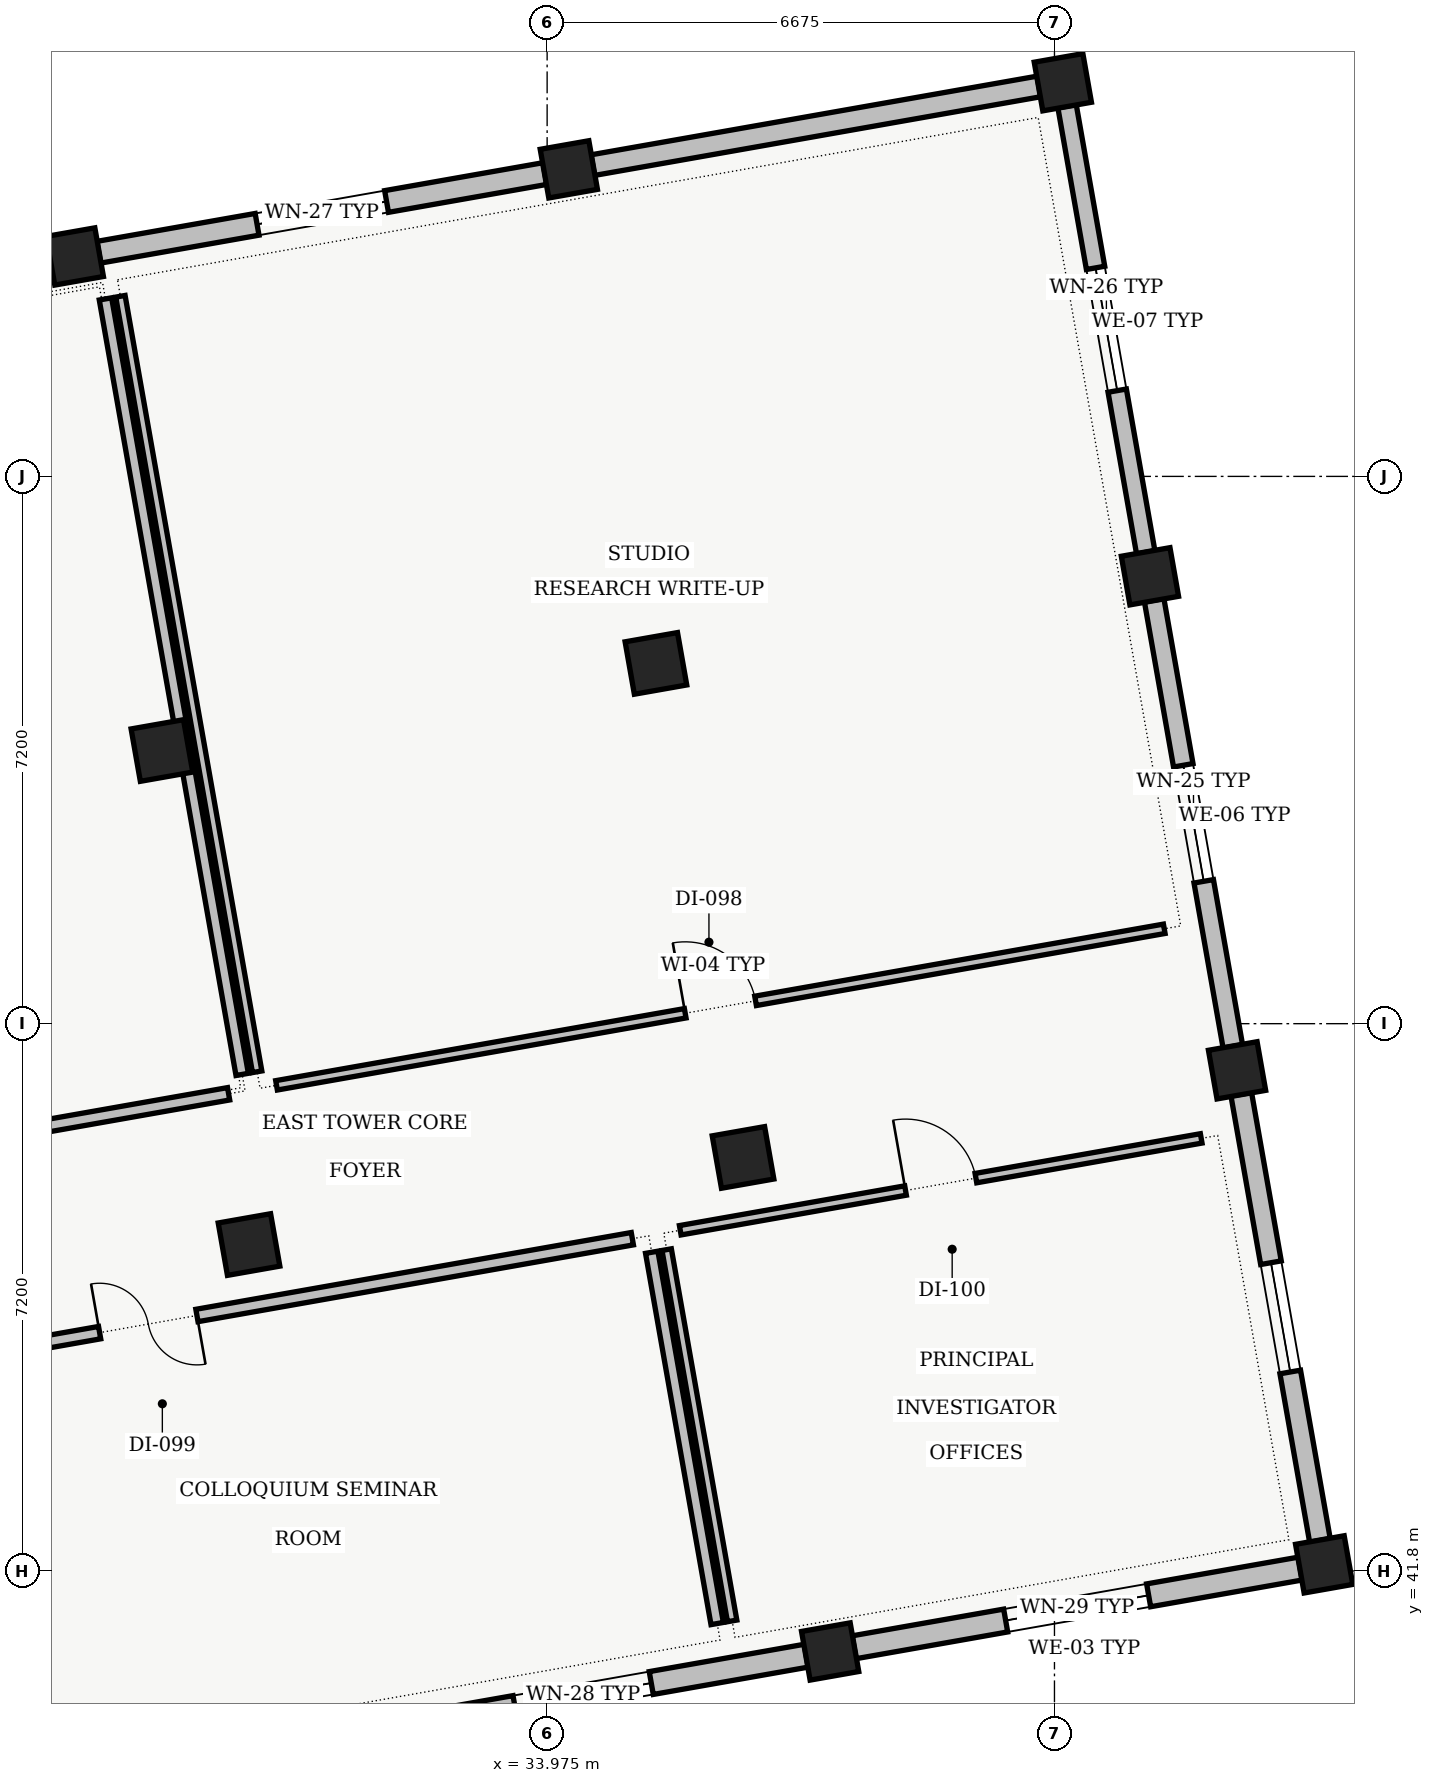
"""IFC4 building model, lengths in metres.
Left out: names, types, materials, properties, quantities, classifications, styles, units other than length and angle.
Written with IfcOpenShell. Run it as: python <this file> out.ifc"""

import sys

from ifc_helpers import new_model, si_unit, direction, frame, frame_2d, origin, origin_2d, place, context, subcontext, project, spatial, rectangle, extrude, element, fill, save


model = new_model("IFC4")
c1 = context("Model", 3, precision=1e-05, world=origin(), true_north=direction((0.0, 1.0)))
c2 = subcontext(c1, "Body", "Model", "MODEL_VIEW")
j1 = project(units=[si_unit("LENGTHUNIT", "METRE"), si_unit("PLANEANGLEUNIT", "RADIAN")], contexts=[c1])
p1 = place(None, origin())
s1 = spatial("IfcSite", under=j1, at=p1, CompositionType="ELEMENT")
p2 = place(p1, origin())
s2 = spatial("IfcBuilding", under=s1, at=p2, CompositionType="ELEMENT")
p3 = place(p2, frame((0.0, 0.0, 14.1)))
s3 = spatial("IfcBuildingStorey", under=s2, at=p3, CompositionType="ELEMENT", Elevation=14.1)
for number, where, z_axis, x_axis in (
    (1, (30.053, 46.094, 0.0), (0.0, 0.0, 1.0), (0.985, 0.174, 0.0)),
    (2, (28.907, 52.594, 0.0), (0.0, 0.0, 1.0), (0.985, 0.174, 0.0)),
):
    element("IfcColumn", number, at=place(p3, frame(where, z_axis=z_axis, x_axis=x_axis)), inside=s3, PredefinedType="COLUMN", context=c2, shape_type="SweptSolid", body=[
        extrude(rectangle(XDim=0.7, YDim=0.7, at=origin_2d()), origin(), (0.0, 0.0, 1.0), 4.31),
    ])
for number, where, z_axis, x_axis in (
    (3, (27.761, 59.094, 0.0), (0.0, 0.0, 1.0), (0.985, 0.174, 0.0)),
    (4, (37.699, 40.74, 0.0), (0.0, 0.0, 1.0), (0.985, 0.174, 0.0)),
):
    element("IfcColumn", number, at=place(p3, frame(where, z_axis=z_axis, x_axis=x_axis)), inside=s3, PredefinedType="COLUMN", context=c2, shape_type="SweptSolid", body=[
        extrude(rectangle(XDim=0.65, YDim=0.65, at=origin_2d()), origin(), (0.0, 0.0, 1.0), 4.31),
    ])
for number, where, z_axis, x_axis in (
    (5, (36.552, 47.24, 0.0), (0.0, 0.0, 1.0), (0.985, 0.174, 0.0)),
    (6, (35.406, 53.74, 0.0), (0.0, 0.0, 1.0), (0.985, 0.174, 0.0)),
):
    element("IfcColumn", number, at=place(p3, frame(where, z_axis=z_axis, x_axis=x_axis)), inside=s3, PredefinedType="COLUMN", context=c2, shape_type="SweptSolid", body=[
        extrude(rectangle(XDim=0.7, YDim=0.7, at=origin_2d()), origin(), (0.0, 0.0, 1.0), 4.31),
    ])
for number, where, z_axis, x_axis in (
    (7, (34.26, 60.24, 0.0), (0.0, 0.0, 1.0), (0.985, 0.174, 0.0)),
    (8, (44.198, 41.886, 0.0), (0.0, 0.0, 1.0), (0.985, 0.174, 0.0)),
    (9, (43.052, 48.386, 0.0), (0.0, 0.0, 1.0), (0.985, 0.174, 0.0)),
    (10, (41.906, 54.886, 0.0), (0.0, 0.0, 1.0), (0.985, 0.174, 0.0)),
    (11, (40.76, 61.386, 0.0), (0.0, 0.0, 1.0), (0.985, 0.174, 0.0)),
):
    element("IfcColumn", number, at=place(p3, frame(where, z_axis=z_axis, x_axis=x_axis)), inside=s3, PredefinedType="COLUMN", context=c2, shape_type="SweptSolid", body=[
        extrude(rectangle(XDim=0.65, YDim=0.65, at=origin_2d()), origin(), (0.0, 0.0, 1.0), 4.31),
    ])
p4 = place(p3, frame((28.076, 59.149, 0.0), z_axis=(0.0, 0.0, 1.0), x_axis=(0.98480829201, 0.173645120828, 0.0)))
e12 = element("IfcWall", 12, at=p4, inside=s3, PredefinedType="STANDARD", context=c2, shape_type="SweptSolid", body=[
    extrude(rectangle(XDim=5.96, YDim=0.29, at=frame_2d((2.98, 0.0))), origin(), (0.0, 0.0, 1.0), 3.795),
])
p5 = place(p4, frame((2.115, 0.0, 0.95)))
e13 = element("IfcOpeningElement", 13, at=p5, cuts=e12, PredefinedType="OPENING", context=c2, shape_type="SweptSolid", body=[
    extrude(rectangle(XDim=1.73, YDim=1.36, at=frame_2d((0.865, 0.68))), frame((0.0, 0.145, 0.0), z_axis=(0.0, -1.0, 0.0), x_axis=(1.0, 0.0, 0.0)), (0.0, 0.0, 1.0), 0.29),
])
p6 = place(p3, frame((34.575, 60.295, 0.0), z_axis=(0.0, 0.0, 1.0), x_axis=(0.984809527099, 0.173638116021, 0.0)))
e14 = element("IfcWall", 14, at=p6, inside=s3, PredefinedType="STANDARD", context=c2, shape_type="SweptSolid", body=[
    extrude(rectangle(XDim=5.96, YDim=0.275, at=frame_2d((2.98, 0.0))), origin(), (0.0, 0.0, 1.0), 3.795),
])
p7 = place(p3, frame((40.816, 61.071, 0.0), z_axis=(0.0, 0.0, 1.0), x_axis=(0.173645120828, -0.98480829201, 0.0)))
e15 = element("IfcWall", 15, at=p7, inside=s3, PredefinedType="STANDARD", context=c2, shape_type="SweptSolid", body=[
    extrude(rectangle(XDim=5.96, YDim=0.245, at=frame_2d((2.98, 0.0))), origin(), (0.0, 0.0, 1.0), 3.795),
])
p8 = place(p7, frame((2.16, 0.0, 0.95)))
e16 = element("IfcOpeningElement", 16, at=p8, cuts=e15, PredefinedType="OPENING", context=c2, shape_type="SweptSolid", body=[
    extrude(rectangle(XDim=1.64, YDim=1.48, at=frame_2d((0.82, 0.74))), frame((0.0, 0.123, 0.0), z_axis=(0.0, -1.0, 0.0), x_axis=(1.0, 0.0, 0.0)), (0.0, 0.0, 1.0), 0.245),
])
p9 = place(p3, frame((41.962, 54.571, 0.0), z_axis=(0.0, 0.0, 1.0), x_axis=(0.173645120828, -0.98480829201, 0.0)))
e17 = element("IfcWall", 17, at=p9, inside=s3, PredefinedType="STANDARD", context=c2, shape_type="SweptSolid", body=[
    extrude(rectangle(XDim=5.96, YDim=0.26, at=frame_2d((2.98, 0.0))), origin(), (0.0, 0.0, 1.0), 3.795),
])
p10 = place(p9, frame((2.205, 0.0, 0.95)))
e18 = element("IfcOpeningElement", 18, at=p10, cuts=e17, PredefinedType="OPENING", context=c2, shape_type="SweptSolid", body=[
    extrude(rectangle(XDim=1.55, YDim=1.46, at=frame_2d((0.775, 0.73))), frame((0.0, 0.13, 0.0), z_axis=(0.0, -1.0, 0.0), x_axis=(1.0, 0.0, 0.0)), (0.0, 0.0, 1.0), 0.26),
])
p11 = place(p3, frame((43.108, 48.071, 0.0), z_axis=(0.0, 0.0, 1.0), x_axis=(0.173645120828, -0.98480829201, 0.0)))
e19 = element("IfcWall", 19, at=p11, inside=s3, PredefinedType="STANDARD", context=c2, shape_type="SweptSolid", body=[
    extrude(rectangle(XDim=5.96, YDim=0.275, at=frame_2d((2.98, 0.0))), origin(), (0.0, 0.0, 1.0), 3.795),
])
p12 = place(p11, frame((2.25, 0.0, 0.95)))
e20 = element("IfcOpeningElement", 20, at=p12, cuts=e19, PredefinedType="OPENING", context=c2, shape_type="SweptSolid", body=[
    extrude(rectangle(XDim=1.46, YDim=1.44, at=frame_2d((0.73, 0.72))), frame((0.0, 0.137, 0.0), z_axis=(0.0, -1.0, 0.0), x_axis=(1.0, 0.0, 0.0)), (0.0, 0.0, 1.0), 0.275),
])
p13 = place(p3, frame((43.883, 41.831, 0.0), z_axis=(0.0, 0.0, 1.0), x_axis=(-0.98480829201, -0.173645120828, 0.0)))
e21 = element("IfcWall", 21, at=p13, inside=s3, PredefinedType="STANDARD", context=c2, shape_type="SweptSolid", body=[
    extrude(rectangle(XDim=5.96, YDim=0.305, at=frame_2d((2.98, 0.0))), origin(), (0.0, 0.0, 1.0), 3.795),
])
p14 = place(p13, frame((2.025, 0.0, 0.95)))
e22 = element("IfcOpeningElement", 22, at=p14, cuts=e21, PredefinedType="OPENING", context=c2, shape_type="SweptSolid", body=[
    extrude(rectangle(XDim=1.91, YDim=1.4, at=frame_2d((0.955, 0.7))), frame((0.0, 0.152, 0.0), z_axis=(0.0, -1.0, 0.0), x_axis=(1.0, 0.0, 0.0)), (0.0, 0.0, 1.0), 0.305),
])
p15 = place(p3, frame((37.384, 40.685, 0.0), z_axis=(0.0, 0.0, 1.0), x_axis=(-0.98480829201, -0.173645120828, 0.0)))
e23 = element("IfcWall", 23, at=p15, inside=s3, PredefinedType="STANDARD", context=c2, shape_type="SweptSolid", body=[
    extrude(rectangle(XDim=5.96, YDim=0.305, at=frame_2d((2.98, 0.0))), origin(), (0.0, 0.0, 1.0), 3.795),
])
p16 = place(p15, frame((2.07, 0.0, 0.95)))
e24 = element("IfcOpeningElement", 24, at=p16, cuts=e23, PredefinedType="OPENING", context=c2, shape_type="SweptSolid", body=[
    extrude(rectangle(XDim=1.82, YDim=1.38, at=frame_2d((0.91, 0.69))), frame((0.0, 0.152, 0.0), z_axis=(0.0, -1.0, 0.0), x_axis=(1.0, 0.0, 0.0)), (0.0, 0.0, 1.0), 0.305),
])
p17 = place(p3, frame((20.665, 46.469, 0.0), z_axis=(0.0, 0.0, 1.0), x_axis=(0.984804784872, 0.173665009985, 0.0)))
e25 = element("IfcWall", 25, at=p17, inside=s3, PredefinedType="PARTITIONING", context=c2, shape_type="SweptSolid", body=[
    extrude(rectangle(XDim=9.26, YDim=0.165, at=frame_2d((4.63, 0.0))), origin(), (0.0, 0.0, 1.0), 3.895),
])
p18 = place(p17, frame((4.175, 0.0, 0.0)))
e26 = element("IfcOpeningElement", 26, at=p18, cuts=e25, PredefinedType="OPENING", context=c2, shape_type="SweptSolid", body=[
    extrude(rectangle(XDim=0.91, YDim=2.08, at=frame_2d((0.455, 1.04))), frame((0.0, 0.083, 0.0), z_axis=(0.0, -1.0, 0.0), x_axis=(1.0, 0.0, 0.0)), (0.0, 0.0, 1.0), 0.165),
])
p19 = place(p3, frame((29.963, 48.333, 0.0), z_axis=(0.0, 0.0, 1.0), x_axis=(-0.173658960975, 0.984805851563, 0.0)))
e27 = element("IfcWall", 27, at=p19, inside=s3, PredefinedType="PARTITIONING", context=c2, shape_type="SweptSolid", body=[
    extrude(rectangle(XDim=10.36, YDim=0.165, at=frame_2d((5.18, 0.0))), origin(), (0.0, 0.0, 1.0), 3.695),
])
p20 = place(p3, frame((30.415, 48.189, 0.0), z_axis=(0.0, 0.0, 1.0), x_axis=(0.984810073067, 0.173635019467, 0.0)))
e28 = element("IfcWall", 28, at=p20, inside=s3, PredefinedType="PARTITIONING", context=c2, shape_type="SweptSolid", body=[
    extrude(rectangle(XDim=11.86, YDim=0.125, at=frame_2d((5.93, 0.0))), origin(), (0.0, 0.0, 1.0), 3.95),
])
p21 = place(p20, frame((5.46, 0.0, 0.0)))
e29 = element("IfcOpeningElement", 29, at=p21, cuts=e28, PredefinedType="OPENING", context=c2, shape_type="SweptSolid", body=[
    extrude(rectangle(XDim=0.94, YDim=2.12, at=frame_2d((0.47, 1.06))), frame((0.0, 0.062, 0.0), z_axis=(0.0, -1.0, 0.0), x_axis=(1.0, 0.0, 0.0)), (0.0, 0.0, 1.0), 0.125),
])
p22 = place(p3, frame((28.361, 58.57, 0.0), z_axis=(0.0, 0.0, 1.0), x_axis=(0.173632075677, -0.984810592092, 0.0)))
e30 = element("IfcWall", 30, at=p22, inside=s3, PredefinedType="PARTITIONING", context=c2, shape_type="SweptSolid", body=[
    extrude(rectangle(XDim=10.36, YDim=0.125, at=frame_2d((5.18, 0.0))), origin(), (0.0, 0.0, 1.0), 3.95),
])
p23 = place(p3, frame((36.212, 41.108, 0.0), z_axis=(0.0, 0.0, 1.0), x_axis=(-0.173611232021, 0.984814266812, 0.0)))
e31 = element("IfcWall", 31, at=p23, inside=s3, PredefinedType="PARTITIONING", context=c2, shape_type="SweptSolid", body=[
    extrude(rectangle(XDim=4.96, YDim=0.165, at=frame_2d((2.48, 0.0))), origin(), (0.0, 0.0, 1.0), 3.95),
])
p24 = place(p3, frame((35.096, 46.171, 0.0), z_axis=(0.0, 0.0, 1.0), x_axis=(-0.98480912325, -0.173640406486, 0.0)))
e32 = element("IfcWall", 32, at=p24, inside=s3, PredefinedType="PARTITIONING", context=c2, shape_type="SweptSolid", body=[
    extrude(rectangle(XDim=9.61, YDim=0.165, at=frame_2d((4.805, 0.0))), origin(), (0.0, 0.0, 1.0), 3.95),
])
p25 = place(p24, frame((5.817, 0.0, 0.0)))
e33 = element("IfcOpeningElement", 33, at=p25, cuts=e32, PredefinedType="OPENING", context=c2, shape_type="SweptSolid", body=[
    extrude(rectangle(XDim=1.3, YDim=2.18, at=frame_2d((0.65, 1.09))), frame((0.0, 0.083, 0.0), z_axis=(0.0, -1.0, 0.0), x_axis=(1.0, 0.0, 0.0)), (0.0, 0.0, 1.0), 0.165),
])
p26 = place(p3, frame((42.581, 47.491, 0.0), z_axis=(0.0, 0.0, 1.0), x_axis=(-0.984804033539, -0.173669270527, 0.0)))
e34 = element("IfcWall", 34, at=p26, inside=s3, PredefinedType="PARTITIONING", context=c2, shape_type="SweptSolid", body=[
    extrude(rectangle(XDim=6.96, YDim=0.125, at=frame_2d((3.48, 0.0))), origin(), (0.0, 0.0, 1.0), 3.95),
])
p27 = place(p26, frame((3.01, 0.0, 0.0)))
e35 = element("IfcOpeningElement", 35, at=p27, cuts=e34, PredefinedType="OPENING", context=c2, shape_type="SweptSolid", body=[
    extrude(rectangle(XDim=0.94, YDim=2.12, at=frame_2d((0.47, 1.06))), frame((0.0, 0.062, 0.0), z_axis=(0.0, -1.0, 0.0), x_axis=(1.0, 0.0, 0.0)), (0.0, 0.0, 1.0), 0.125),
])
p28 = place(p3, frame((35.548, 46.027, 0.0), z_axis=(0.0, 0.0, 1.0), x_axis=(0.173650553511, -0.984807334084, 0.0)))
e36 = element("IfcWall", 36, at=p28, inside=s3, PredefinedType="PARTITIONING", context=c2, shape_type="SweptSolid", body=[
    extrude(rectangle(XDim=4.96, YDim=0.125, at=frame_2d((2.48, 0.0))), origin(), (0.0, 0.0, 1.0), 3.95),
])
p29 = place(p5, origin())
e37 = element("IfcWindow", 37, at=p29, inside=s3, PartitioningType="SINGLE_PANEL", PredefinedType="WINDOW", context=c2, shape_type="SweptSolid", body=[
    extrude(rectangle(XDim=1.73, YDim=1.36, at=frame_2d((0.865, 0.68))), frame((0.0, 0.03, 0.0), z_axis=(0.0, -1.0, 0.0), x_axis=(1.0, 0.0, 0.0)), (0.0, 0.0, 1.0), 0.06),
])
fill(e13, e37)
p30 = place(p8, origin())
e38 = element("IfcWindow", 38, at=p30, inside=s3, PartitioningType="SINGLE_PANEL", PredefinedType="WINDOW", context=c2, shape_type="SweptSolid", body=[
    extrude(rectangle(XDim=1.64, YDim=1.48, at=frame_2d((0.82, 0.74))), frame((0.0, 0.03, 0.0), z_axis=(0.0, -1.0, 0.0), x_axis=(1.0, 0.0, 0.0)), (0.0, 0.0, 1.0), 0.06),
])
fill(e16, e38)
p31 = place(p10, origin())
e39 = element("IfcWindow", 39, at=p31, inside=s3, PartitioningType="SINGLE_PANEL", PredefinedType="WINDOW", context=c2, shape_type="SweptSolid", body=[
    extrude(rectangle(XDim=1.55, YDim=1.46, at=frame_2d((0.775, 0.73))), frame((0.0, 0.03, 0.0), z_axis=(0.0, -1.0, 0.0), x_axis=(1.0, 0.0, 0.0)), (0.0, 0.0, 1.0), 0.06),
])
fill(e18, e39)
p32 = place(p12, origin())
e40 = element("IfcWindow", 40, at=p32, inside=s3, PartitioningType="SINGLE_PANEL", PredefinedType="WINDOW", context=c2, shape_type="SweptSolid", body=[
    extrude(rectangle(XDim=1.46, YDim=1.44, at=frame_2d((0.73, 0.72))), frame((0.0, 0.03, 0.0), z_axis=(0.0, -1.0, 0.0), x_axis=(1.0, 0.0, 0.0)), (0.0, 0.0, 1.0), 0.06),
])
fill(e20, e40)
p33 = place(p14, origin())
e41 = element("IfcWindow", 41, at=p33, inside=s3, PartitioningType="SINGLE_PANEL", PredefinedType="WINDOW", context=c2, shape_type="SweptSolid", body=[
    extrude(rectangle(XDim=1.91, YDim=1.4, at=frame_2d((0.955, 0.7))), frame((0.0, 0.03, 0.0), z_axis=(0.0, -1.0, 0.0), x_axis=(1.0, 0.0, 0.0)), (0.0, 0.0, 1.0), 0.06),
])
fill(e22, e41)
p34 = place(p16, origin())
e42 = element("IfcWindow", 42, at=p34, inside=s3, PartitioningType="SINGLE_PANEL", PredefinedType="WINDOW", context=c2, shape_type="SweptSolid", body=[
    extrude(rectangle(XDim=1.82, YDim=1.38, at=frame_2d((0.91, 0.69))), frame((0.0, 0.03, 0.0), z_axis=(0.0, -1.0, 0.0), x_axis=(1.0, 0.0, 0.0)), (0.0, 0.0, 1.0), 0.06),
])
fill(e24, e42)
p35 = place(p21, origin())
e43 = element("IfcDoor", 43, at=p35, inside=s3, OperationType="SINGLE_SWING_LEFT", PredefinedType="DOOR", context=c2, shape_type="SweptSolid", body=[
    extrude(rectangle(XDim=0.94, YDim=2.12, at=frame_2d((0.47, 1.06))), frame((0.0, 0.025, 0.0), z_axis=(0.0, -1.0, 0.0), x_axis=(1.0, 0.0, 0.0)), (0.0, 0.0, 1.0), 0.05),
])
fill(e29, e43)
p36 = place(p25, origin())
e44 = element("IfcDoor", 44, at=p36, inside=s3, OperationType="DOUBLE_DOOR_SINGLE_SWING", PredefinedType="DOOR", context=c2, shape_type="SweptSolid", body=[
    extrude(rectangle(XDim=1.3, YDim=2.18, at=frame_2d((0.65, 1.09))), frame((0.0, 0.025, 0.0), z_axis=(0.0, -1.0, 0.0), x_axis=(1.0, 0.0, 0.0)), (0.0, 0.0, 1.0), 0.05),
])
fill(e33, e44)
p37 = place(p27, origin())
e45 = element("IfcDoor", 45, at=p37, inside=s3, OperationType="SINGLE_SWING_RIGHT", PredefinedType="DOOR", context=c2, shape_type="SweptSolid", body=[
    extrude(rectangle(XDim=0.94, YDim=2.12, at=frame_2d((0.47, 1.06))), frame((0.0, 0.025, 0.0), z_axis=(0.0, -1.0, 0.0), x_axis=(1.0, 0.0, 0.0)), (0.0, 0.0, 1.0), 0.05),
])
fill(e35, e45)
save(model, sys.argv[1])
